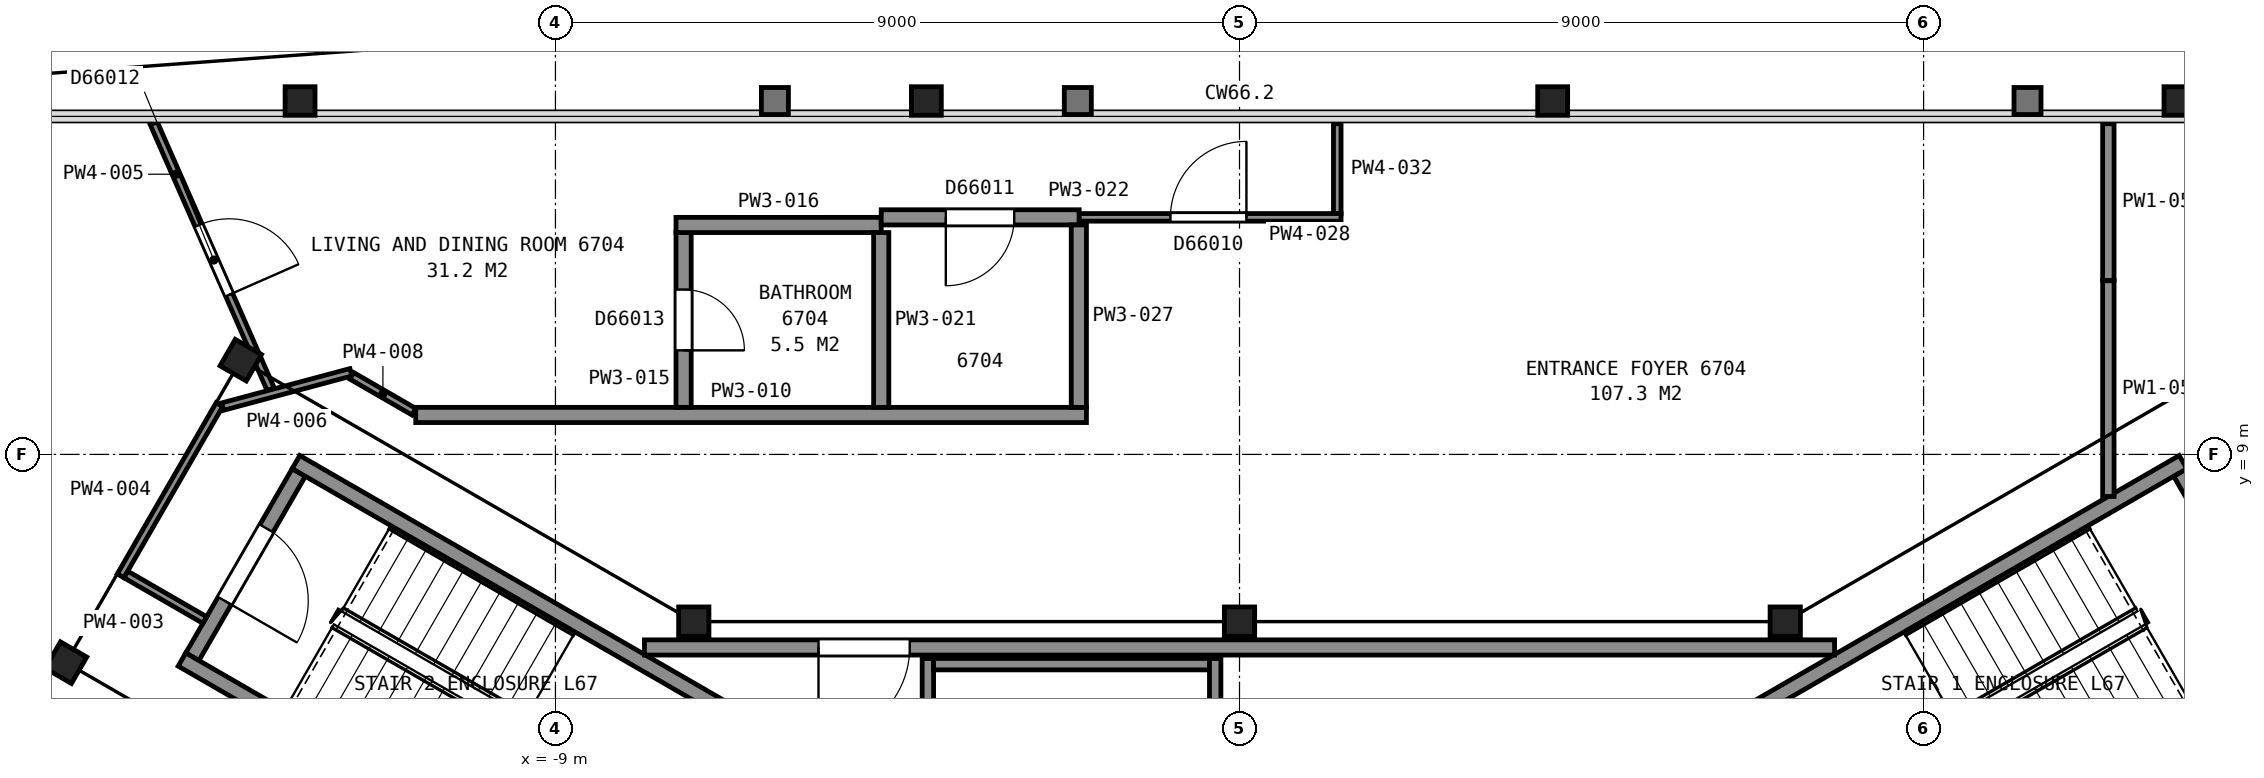
"""IFC4 building model, lengths in metres.
Left out: names, types, materials, properties, quantities, classifications, styles, units other than length and angle.
Written with IfcOpenShell. Run it as: python <this file> out.ifc"""

import sys

from ifc_helpers import new_model, si_unit, direction, frame, frame_2d, origin, origin_2d, place, context, subcontext, project, spatial, rectangle, i_section, extrude, element, fill, save


model = new_model("IFC4")
c1 = context("Model", 3, precision=1e-05, world=origin(), true_north=direction((0.0, 1.0)))
c2 = subcontext(c1, "Body", "Model", "MODEL_VIEW")
j1 = project(units=[si_unit("LENGTHUNIT", "METRE"), si_unit("PLANEANGLEUNIT", "RADIAN")], contexts=[c1])
p1 = place(None, origin())
s1 = spatial("IfcSite", under=j1, at=p1, CompositionType="ELEMENT")
p2 = place(p1, origin())
s2 = spatial("IfcBuilding", under=s1, at=p2, CompositionType="ELEMENT")
p3 = place(p2, frame((0.0, 0.0, 267.7)))
s3 = spatial("IfcBuildingStorey", under=s2, at=p3, CompositionType="ELEMENT", Elevation=267.7)
for number, where, z_axis, x_axis in (
    (1, (12.36, 13.65, 0.0), (0.0, 0.0, 1.0), (1.0, 0.0, 0.0)),
    (2, (4.12, 13.65, 0.0), (0.0, 0.0, 1.0), (1.0, 0.0, 0.0)),
    (3, (-4.12, 13.65, 0.0), (0.0, 0.0, 1.0), (1.0, 0.0, 0.0)),
    (4, (-12.36, 13.65, 0.0), (0.0, 0.0, 1.0), (1.0, 0.0, 0.0)),
):
    element("IfcColumn", number, at=place(p3, frame(where, z_axis=z_axis, x_axis=x_axis)), inside=s3, PredefinedType="COLUMN", context=c2, shape_type="SweptSolid", body=[
        extrude(i_section(OverallWidth=0.394, OverallDepth=0.376, WebThickness=0.017, FlangeThickness=0.028, FilletRadius=0.015, at=origin_2d()), origin(), (0.0, 0.0, 1.0), 3.7),
    ])
for number, where, z_axis, x_axis in (
    (5, (7.18, 6.8, 0.0), (0.0, 0.0, 1.0), (1.0, 0.0, 0.0)),
    (6, (0.0, 6.8, 0.0), (0.0, 0.0, 1.0), (1.0, 0.0, 0.0)),
    (7, (-7.18, 6.8, 0.0), (0.0, 0.0, 1.0), (1.0, 0.0, 0.0)),
):
    element("IfcColumn", number, at=place(p3, frame(where, z_axis=z_axis, x_axis=x_axis)), inside=s3, PredefinedType="COLUMN", context=c2, shape_type="SweptSolid", body=[
        extrude(i_section(OverallWidth=0.399, OverallDepth=0.386, WebThickness=0.021, FlangeThickness=0.033, FilletRadius=0.015, at=origin_2d()), origin(), (0.0, 0.0, 1.0), 3.7),
    ])
for number, where, z_axis, x_axis in (
    (8, (-13.14, 10.24, 0.0), (0.0, 0.0, 1.0), (0.5, 0.866, 0.0)),
    (9, (-15.44, 6.26, 0.0), (0.0, 0.0, 1.0), (0.5, 0.866, 0.0)),
):
    element("IfcColumn", number, at=place(p3, frame(where, z_axis=z_axis, x_axis=x_axis)), inside=s3, PredefinedType="COLUMN", context=c2, shape_type="SweptSolid", body=[
        extrude(i_section(OverallWidth=0.401, OverallDepth=0.399, WebThickness=0.025, FlangeThickness=0.04, FilletRadius=0.015, at=origin_2d()), origin(), (0.0, 0.0, 1.0), 3.7),
    ])
p4 = place(p3, frame((13.777, 6.338, 0.0), z_axis=(0.0, 0.0, 1.0), x_axis=(-0.500049511043, 0.865996816683, 0.0)))
e10 = element("IfcWall", 10, at=p4, inside=s3, PredefinedType="PARTITIONING", context=c2, shape_type="SweptSolid", body=[
    extrude(rectangle(XDim=2.8, YDim=0.2, at=frame_2d((1.4, 0.0))), origin(), (0.0, 0.0, 1.0), 3.45),
])
p5 = place(p4, frame((0.85, 0.0, 0.0)))
e11 = element("IfcOpeningElement", 11, at=p5, cuts=e10, PredefinedType="OPENING", context=c2, shape_type="SweptSolid", body=[
    extrude(rectangle(XDim=1.1, YDim=2.1, at=frame_2d((0.55, 1.05))), frame((0.0, 0.11, 0.0), z_axis=(0.0, -1.0, 0.0), x_axis=(1.0, 0.0, 0.0)), (0.0, 0.0, 1.0), 0.22),
])
for number, where, z_axis, x_axis in (
    (12, (6.178, 5.299, 0.0), (0.0, 0.0, 1.0), (0.866, 0.5, 0.0)),
    (13, (7.678, 2.701, 0.0), (0.0, 0.0, 1.0), (0.866, 0.5, 0.0)),
):
    element("IfcWall", number, at=place(p3, frame(where, z_axis=z_axis, x_axis=x_axis)), inside=s3, PredefinedType="PARTITIONING", context=c2, shape_type="SweptSolid", body=[
        extrude(rectangle(XDim=7.2, YDim=0.2, at=frame_2d((3.6, 0.0))), origin(), (0.0, 0.0, 1.0), 3.45),
    ])
p6 = place(p3, frame((-12.377, 8.762, 0.0), z_axis=(0.0, 0.0, 1.0), x_axis=(-0.500049511043, -0.865996816683, 0.0)))
e14 = element("IfcWall", 14, at=p6, inside=s3, PredefinedType="PARTITIONING", context=c2, shape_type="SweptSolid", body=[
    extrude(rectangle(XDim=2.8, YDim=0.2, at=frame_2d((1.4, 0.0))), origin(), (0.0, 0.0, 1.0), 3.45),
])
p7 = place(p6, frame((0.85, 0.0, 0.0)))
e15 = element("IfcOpeningElement", 15, at=p7, cuts=e14, PredefinedType="OPENING", context=c2, shape_type="SweptSolid", body=[
    extrude(rectangle(XDim=1.1, YDim=2.1, at=frame_2d((0.55, 1.05))), frame((0.0, 0.11, 0.0), z_axis=(0.0, -1.0, 0.0), x_axis=(1.0, 0.0, 0.0)), (0.0, 0.0, 1.0), 0.22),
])
for number, where, z_axis, x_axis in (
    (16, (-7.678, 2.701, 0.0), (0.0, 0.0, 1.0), (-0.866, 0.5, 0.0)),
    (17, (-6.178, 5.299, 0.0), (0.0, 0.0, 1.0), (-0.866, 0.5, 0.0)),
):
    element("IfcWall", number, at=place(p3, frame(where, z_axis=z_axis, x_axis=x_axis)), inside=s3, PredefinedType="PARTITIONING", context=c2, shape_type="SweptSolid", body=[
        extrude(rectangle(XDim=7.2, YDim=0.2, at=frame_2d((3.6, 0.0))), origin(), (0.0, 0.0, 1.0), 3.45),
    ])
p8 = place(p3, frame((7.829, 6.46, 0.0), z_axis=(0.0, 0.0, 1.0), x_axis=(-1.0, 0.0, 0.0)))
e18 = element("IfcWall", 18, at=p8, inside=s3, PredefinedType="PARTITIONING", context=c2, shape_type="SweptSolid", body=[
    extrude(rectangle(XDim=15.658, YDim=0.2, at=frame_2d((7.829, 0.0))), origin(), (0.0, 0.0, 1.0), 3.45),
])
p9 = place(p8, frame((12.168, 0.0, 0.0)))
e19 = element("IfcOpeningElement", 19, at=p9, cuts=e18, PredefinedType="OPENING", context=c2, shape_type="SweptSolid", body=[
    extrude(rectangle(XDim=1.2, YDim=2.1, at=frame_2d((0.6, 1.05))), frame((0.0, 0.11, 0.0), z_axis=(0.0, -1.0, 0.0), x_axis=(1.0, 0.0, 0.0)), (0.0, 0.0, 1.0), 0.22),
])
p10 = place(p3, frame((-4.1, 2.085, 0.0), z_axis=(0.0, 0.0, 1.0), x_axis=(0.0, 1.0, 0.0)))
e20 = element("IfcWall", 20, at=p10, inside=s3, PredefinedType="PARTITIONING", context=c2, shape_type="SweptSolid", body=[
    extrude(rectangle(XDim=4.23, YDim=0.15, at=frame_2d((2.115, 0.0))), origin(), (0.0, 0.0, 1.0), 3.45),
])
p11 = place(p10, frame((1.625, 0.0, 0.0)))
e21 = element("IfcOpeningElement", 21, at=p11, cuts=e20, PredefinedType="OPENING", context=c2, shape_type="SweptSolid", body=[
    extrude(rectangle(XDim=1.0, YDim=2.1, at=frame_2d((0.5, 1.05))), frame((0.0, 0.085, 0.0), z_axis=(0.0, -1.0, 0.0), x_axis=(1.0, 0.0, 0.0)), (0.0, 0.0, 1.0), 0.17),
])
p12 = place(p3, frame((-4.025, 6.24, 0.0), z_axis=(0.0, 0.0, 1.0), x_axis=(1.0, 0.0, 0.0)))
e22 = element("IfcWall", 22, at=p12, inside=s3, PredefinedType="PARTITIONING", context=c2, shape_type="SweptSolid", body=[
    extrude(rectangle(XDim=3.63, YDim=0.15, at=frame_2d((1.815, 0.0))), origin(), (0.0, 0.0, 1.0), 3.45),
])
p13 = place(p3, frame((-0.32, 2.252, 0.0), z_axis=(0.0, 0.0, 1.0), x_axis=(0.0, 1.0, 0.0)))
e23 = element("IfcWall", 23, at=p13, inside=s3, PredefinedType="PARTITIONING", context=c2, shape_type="SweptSolid", body=[
    extrude(rectangle(XDim=4.063, YDim=0.15, at=frame_2d((2.031, 0.0))), origin(), (0.0, 0.0, 1.0), 3.45),
])
p14 = place(p3, frame((-14.653, 7.421, 0.0), z_axis=(0.0, 0.0, 1.0), x_axis=(0.865941482684, -0.500145327446, 0.0)))
e24 = element("IfcWall", 24, at=p14, inside=s3, PredefinedType="PARTITIONING", context=c2, shape_type="SweptSolid", body=[
    extrude(rectangle(XDim=1.199, YDim=0.1, at=frame_2d((0.6, 0.0))), origin(), (0.0, 0.0, 1.0), 2.723),
])
p15 = place(p3, frame((-14.721, 7.403, 0.0), z_axis=(0.0, 0.0, 1.0), x_axis=(0.500006934395, 0.866021400173, 0.0)))
e25 = element("IfcWall", 25, at=p15, inside=s3, PredefinedType="PARTITIONING", context=c2, shape_type="SweptSolid", body=[
    extrude(rectangle(XDim=2.6, YDim=0.1, at=frame_2d((1.3, 0.0))), origin(), (0.0, 0.0, 1.0), 2.723),
])
p16 = place(p3, frame((-12.747, 9.857, 0.0), z_axis=(0.0, 0.0, 1.0), x_axis=(-0.402509649346, 0.91541574281, 0.0)))
e26 = element("IfcWall", 26, at=p16, inside=s3, PredefinedType="PARTITIONING", context=c2, shape_type="SweptSolid", body=[
    extrude(rectangle(XDim=3.824, YDim=0.1, at=frame_2d((1.912, 0.0))), origin(), (0.0, 0.0, 1.0), 2.723),
])
p17 = place(p16, frame((1.357, 0.0, 0.0)))
e27 = element("IfcOpeningElement", 27, at=p17, cuts=e26, PredefinedType="OPENING", context=c2, shape_type="SweptSolid", body=[
    extrude(rectangle(XDim=1.0, YDim=2.1, at=frame_2d((0.5, 1.05))), frame((0.0, 0.06, 0.0), z_axis=(0.0, -1.0, 0.0), x_axis=(1.0, 0.0, 0.0)), (0.0, 0.0, 1.0), 0.12),
])
p18 = place(p3, frame((-13.378, 9.629, 0.0), z_axis=(0.0, 0.0, 1.0), x_axis=(0.966007272337, 0.258514892785, 0.0)))
e28 = element("IfcWall", 28, at=p18, inside=s3, PredefinedType="PARTITIONING", context=c2, shape_type="SweptSolid", body=[
    extrude(rectangle(XDim=1.747, YDim=0.1, at=frame_2d((0.874, 0.0))), origin(), (0.0, 0.0, 1.0), 2.723),
])
p19 = place(p3, frame((-11.678, 10.033, 0.0), z_axis=(0.0, 0.0, 1.0), x_axis=(0.866116627388, -0.499841962787, 0.0)))
e29 = element("IfcWall", 29, at=p19, inside=s3, PredefinedType="PARTITIONING", context=c2, shape_type="SweptSolid", body=[
    extrude(rectangle(XDim=0.943, YDim=0.1, at=frame_2d((0.472, 0.0))), origin(), (0.0, 0.0, 1.0), 2.723),
])
p20 = place(p3, frame((-10.838, 9.519, 0.0), z_axis=(0.0, 0.0, 1.0), x_axis=(1.0, 0.0, 0.0)))
e30 = element("IfcWall", 30, at=p20, inside=s3, PredefinedType="PARTITIONING", context=c2, shape_type="SweptSolid", body=[
    extrude(rectangle(XDim=8.824, YDim=0.2, at=frame_2d((4.412, 0.0))), origin(), (0.0, 0.0, 1.0), 2.723),
])
p21 = place(p3, frame((-7.314, 11.919, 0.0), z_axis=(0.0, 0.0, 1.0), x_axis=(0.0, -1.0, 0.0)))
e31 = element("IfcWall", 31, at=p21, inside=s3, PredefinedType="PARTITIONING", context=c2, shape_type="SweptSolid", body=[
    extrude(rectangle(XDim=2.3, YDim=0.2, at=frame_2d((1.15, 0.0))), origin(), (0.0, 0.0, 1.0), 2.723),
])
p22 = place(p21, frame((0.75, 0.0, 0.0)))
e32 = element("IfcOpeningElement", 32, at=p22, cuts=e31, PredefinedType="OPENING", context=c2, shape_type="SweptSolid", body=[
    extrude(rectangle(XDim=0.8, YDim=2.1, at=frame_2d((0.4, 1.05))), frame((0.0, 0.11, 0.0), z_axis=(0.0, -1.0, 0.0), x_axis=(1.0, 0.0, 0.0)), (0.0, 0.0, 1.0), 0.22),
])
p23 = place(p3, frame((-7.414, 12.019, 0.0), z_axis=(0.0, 0.0, 1.0), x_axis=(1.0, 0.0, 0.0)))
e33 = element("IfcWall", 33, at=p23, inside=s3, PredefinedType="PARTITIONING", context=c2, shape_type="SweptSolid", body=[
    extrude(rectangle(XDim=2.7, YDim=0.2, at=frame_2d((1.35, 0.0))), origin(), (0.0, 0.0, 1.0), 2.723),
])
p24 = place(p3, frame((-4.714, 9.619, 0.0), z_axis=(0.0, 0.0, 1.0), x_axis=(0.0, 1.0, 0.0)))
e34 = element("IfcWall", 34, at=p24, inside=s3, PredefinedType="PARTITIONING", context=c2, shape_type="SweptSolid", body=[
    extrude(rectangle(XDim=2.3, YDim=0.2, at=frame_2d((1.15, 0.0))), origin(), (0.0, 0.0, 1.0), 2.723),
])
p25 = place(p3, frame((-2.109, 12.119, 0.0), z_axis=(0.0, 0.0, 1.0), x_axis=(-1.0, 0.0, 0.0)))
e35 = element("IfcWall", 35, at=p25, inside=s3, PredefinedType="PARTITIONING", context=c2, shape_type="SweptSolid", body=[
    extrude(rectangle(XDim=2.605, YDim=0.2, at=frame_2d((1.303, 0.0))), origin(), (0.0, 0.0, 1.0), 2.723),
])
p26 = place(p25, frame((0.855, 0.0, 0.0)))
e36 = element("IfcOpeningElement", 36, at=p26, cuts=e35, PredefinedType="OPENING", context=c2, shape_type="SweptSolid", body=[
    extrude(rectangle(XDim=0.9, YDim=2.1, at=frame_2d((0.45, 1.05))), frame((0.0, 0.11, 0.0), z_axis=(0.0, -1.0, 0.0), x_axis=(1.0, 0.0, 0.0)), (0.0, 0.0, 1.0), 0.22),
])
p27 = place(p3, frame((-2.114, 9.619, 0.0), z_axis=(0.0, 0.0, 1.0), x_axis=(0.0, 1.0, 0.0)))
e37 = element("IfcWall", 37, at=p27, inside=s3, PredefinedType="PARTITIONING", context=c2, shape_type="SweptSolid", body=[
    extrude(rectangle(XDim=2.4, YDim=0.2, at=frame_2d((1.2, 0.0))), origin(), (0.0, 0.0, 1.0), 2.723),
])
p28 = place(p3, frame((-2.109, 12.119, 0.0), z_axis=(0.0, 0.0, 1.0), x_axis=(1.0, 0.0, 0.0)))
e38 = element("IfcWall", 38, at=p28, inside=s3, PredefinedType="PARTITIONING", context=c2, shape_type="SweptSolid", body=[
    extrude(rectangle(XDim=3.445, YDim=0.1, at=frame_2d((1.722, 0.0))), origin(), (0.0, 0.0, 1.0), 2.723),
])
p29 = place(p28, frame((1.2, 0.0, 0.0)))
e39 = element("IfcOpeningElement", 39, at=p29, cuts=e38, PredefinedType="OPENING", context=c2, shape_type="SweptSolid", body=[
    extrude(rectangle(XDim=1.0, YDim=2.1, at=frame_2d((0.5, 1.05))), frame((0.0, 0.06, 0.0), z_axis=(0.0, -1.0, 0.0), x_axis=(1.0, 0.0, 0.0)), (0.0, 0.0, 1.0), 0.12),
])
p30 = place(p3, frame((1.286, 12.169, 0.0), z_axis=(0.0, 0.0, 1.0), x_axis=(0.0, 1.0, 0.0)))
e40 = element("IfcWall", 40, at=p30, inside=s3, PredefinedType="PARTITIONING", context=c2, shape_type="SweptSolid", body=[
    extrude(rectangle(XDim=1.182, YDim=0.1, at=frame_2d((0.591, 0.0))), origin(), (0.0, 0.0, 1.0), 2.723),
])
p31 = place(p3, frame((11.431, 8.447, 0.0), z_axis=(0.0, 0.0, 1.0), x_axis=(0.0, 1.0, 0.0)))
e41 = element("IfcWall", 41, at=p31, inside=s3, PredefinedType="PARTITIONING", context=c2, shape_type="SweptSolid", body=[
    extrude(rectangle(XDim=2.838, YDim=0.15, at=frame_2d((1.419, 0.0))), origin(), (0.0, 0.0, 1.0), 2.723),
])
p32 = place(p3, frame((11.431, 11.29, 0.0), z_axis=(0.0, 0.0, 1.0), x_axis=(0.0, 1.0, 0.0)))
e42 = element("IfcWall", 42, at=p32, inside=s3, PredefinedType="PARTITIONING", context=c2, shape_type="SweptSolid", body=[
    extrude(rectangle(XDim=2.061, YDim=0.15, at=frame_2d((1.031, 0.0))), origin(), (0.0, 0.0, 1.0), 2.723),
])
p33 = place(p7, origin())
e43 = element("IfcDoor", 43, at=p33, inside=s3, OperationType="SINGLE_SWING_RIGHT", PredefinedType="DOOR", context=c2, shape_type="SweptSolid", body=[
    extrude(rectangle(XDim=1.1, YDim=2.1, at=frame_2d((0.55, 1.05))), frame((0.0, 0.025, 0.0), z_axis=(0.0, -1.0, 0.0), x_axis=(1.0, 0.0, 0.0)), (0.0, 0.0, 1.0), 0.05),
])
fill(e15, e43)
p34 = place(p9, origin())
e44 = element("IfcDoor", 44, at=p34, inside=s3, OperationType="SINGLE_SWING_RIGHT", PredefinedType="DOOR", context=c2, shape_type="SweptSolid", body=[
    extrude(rectangle(XDim=1.2, YDim=2.1, at=frame_2d((0.6, 1.05))), frame((0.0, 0.025, 0.0), z_axis=(0.0, -1.0, 0.0), x_axis=(1.0, 0.0, 0.0)), (0.0, 0.0, 1.0), 0.05),
])
fill(e19, e44)
p35 = place(p17, origin())
e45 = element("IfcDoor", 45, at=p35, inside=s3, OperationType="SINGLE_SWING_LEFT", PredefinedType="DOOR", context=c2, shape_type="SweptSolid", body=[
    extrude(rectangle(XDim=1.0, YDim=2.1, at=frame_2d((0.5, 1.05))), frame((0.0, 0.025, 0.0), z_axis=(0.0, -1.0, 0.0), x_axis=(1.0, 0.0, 0.0)), (0.0, 0.0, 1.0), 0.05),
])
fill(e27, e45)
p36 = place(p22, origin())
e46 = element("IfcDoor", 46, at=p36, inside=s3, OperationType="SINGLE_SWING_RIGHT", PredefinedType="DOOR", context=c2, shape_type="SweptSolid", body=[
    extrude(rectangle(XDim=0.8, YDim=2.1, at=frame_2d((0.4, 1.05))), frame((0.0, 0.025, 0.0), z_axis=(0.0, -1.0, 0.0), x_axis=(1.0, 0.0, 0.0)), (0.0, 0.0, 1.0), 0.05),
])
fill(e32, e46)
p37 = place(p26, origin())
e47 = element("IfcDoor", 47, at=p37, inside=s3, OperationType="SINGLE_SWING_RIGHT", PredefinedType="DOOR", context=c2, shape_type="SweptSolid", body=[
    extrude(rectangle(XDim=0.9, YDim=2.1, at=frame_2d((0.45, 1.05))), frame((0.0, 0.025, 0.0), z_axis=(0.0, -1.0, 0.0), x_axis=(1.0, 0.0, 0.0)), (0.0, 0.0, 1.0), 0.05),
])
fill(e36, e47)
p38 = place(p29, origin())
e48 = element("IfcDoor", 48, at=p38, inside=s3, OperationType="SINGLE_SWING_RIGHT", PredefinedType="DOOR", context=c2, shape_type="SweptSolid", body=[
    extrude(rectangle(XDim=1.0, YDim=2.1, at=frame_2d((0.5, 1.05))), frame((0.0, 0.025, 0.0), z_axis=(0.0, -1.0, 0.0), x_axis=(1.0, 0.0, 0.0)), (0.0, 0.0, 1.0), 0.05),
])
fill(e39, e48)
save(model, sys.argv[1])
